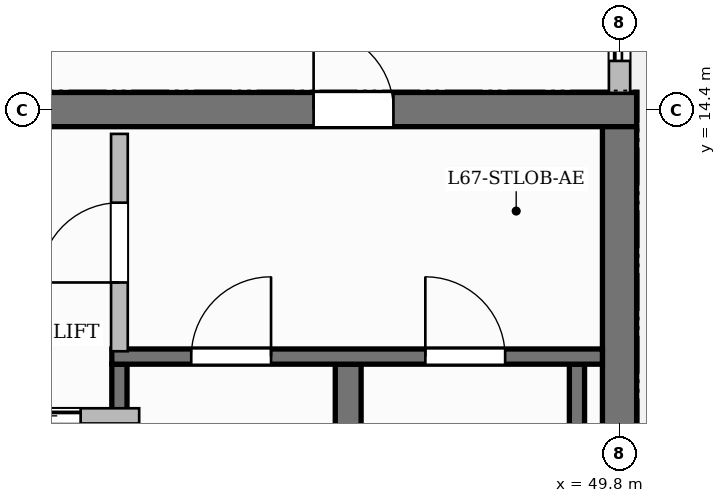
"""IFC4 building model, lengths in metres.
Left out: names, types, materials, properties, quantities, classifications, styles, units other than length and angle.
Written with IfcOpenShell. Run it as: python <this file> out.ifc"""

import sys

from ifc_helpers import new_model, si_unit, direction, frame, frame_2d, origin, place, context, subcontext, project, spatial, rectangle, extrude, source, transform, mapped, element, fill, save


model = new_model("IFC4")
c1 = context("Model", 3, precision=1e-05, world=origin(), true_north=direction((0.0, 1.0)))
c2 = subcontext(c1, "Body", "Model", "MODEL_VIEW")
j1 = project(units=[si_unit("LENGTHUNIT", "METRE"), si_unit("PLANEANGLEUNIT", "RADIAN")], contexts=[c1])
p1 = place(None, origin())
s1 = spatial("IfcSite", under=j1, at=p1, CompositionType="ELEMENT")
p2 = place(p1, origin())
s2 = spatial("IfcBuilding", under=s1, at=p2, CompositionType="ELEMENT")
p3 = place(p2, frame((0.0, 0.0, 267.35)))
s3 = spatial("IfcBuildingStorey", under=s2, at=p3, CompositionType="ELEMENT", Elevation=267.35)
p4 = place(p3, frame((34.575, 14.4, 0.0), z_axis=(0.0, 0.0, 1.0), x_axis=(1.0, 0.0, 0.0)))
e1 = element("IfcWall", 1, at=p4, inside=s3, PredefinedType="SHEAR", context=c2, shape_type="SweptSolid", body=[
    extrude(rectangle(XDim=15.45, YDim=0.45, at=frame_2d((7.725, 0.0))), origin(), (0.0, 0.0, 1.0), 3.85),
])
p5 = place(p4, frame((5.355, 0.0, 0.0)))
e2 = element("IfcOpeningElement", 2, at=p5, cuts=e1, PredefinedType="OPENING", context=c2, shape_type="SweptSolid", body=[
    extrude(rectangle(XDim=1.5, YDim=2.2, at=frame_2d((0.75, 1.1))), frame((0.0, 0.235, 0.0), z_axis=(0.0, -1.0, 0.0), x_axis=(1.0, 0.0, 0.0)), (0.0, 0.0, 1.0), 0.47),
])
p6 = place(p4, frame((1.57, 0.0, 0.0)))
e3 = element("IfcOpeningElement", 3, at=p6, cuts=e1, PredefinedType="OPENING", context=c2, shape_type="SweptSolid", body=[
    extrude(rectangle(XDim=1.05, YDim=2.15, at=frame_2d((0.525, 1.075))), frame((0.0, 0.235, 0.0), z_axis=(0.0, -1.0, 0.0), x_axis=(1.0, 0.0, 0.0)), (0.0, 0.0, 1.0), 0.47),
])
p7 = place(p4, frame((11.2, 0.0, 0.0)))
e4 = element("IfcOpeningElement", 4, at=p7, cuts=e1, PredefinedType="OPENING", context=c2, shape_type="SweptSolid", body=[
    extrude(rectangle(XDim=1.05, YDim=2.15, at=frame_2d((0.525, 1.075))), frame((0.0, 0.235, 0.0), z_axis=(0.0, -1.0, 0.0), x_axis=(1.0, 0.0, 0.0)), (0.0, 0.0, 1.0), 0.47),
])
p8 = place(p3, frame((49.8, 3.825, 0.0), z_axis=(0.0, 0.0, 1.0), x_axis=(0.0, 1.0, 0.0)))
e5 = element("IfcWall", 5, at=p8, inside=s3, PredefinedType="SHEAR", context=c2, shape_type="SweptSolid", body=[
    extrude(rectangle(XDim=10.35, YDim=0.45, at=frame_2d((5.175, 0.0))), origin(), (0.0, 0.0, 1.0), 3.85),
])
p9 = place(p3, frame((43.22, 4.1, 0.0), z_axis=(0.0, 0.0, 1.0), x_axis=(0.0, 1.0, 0.0)))
e6 = element("IfcWall", 6, at=p9, inside=s3, PredefinedType="SHEAR", context=c2, shape_type="SweptSolid", body=[
    extrude(rectangle(XDim=6.95, YDim=0.2, at=frame_2d((3.475, 0.0))), origin(), (0.0, 0.0, 1.0), 3.85),
])
p10 = place(p3, frame((46.23, 4.1, 0.0), z_axis=(0.0, 0.0, 1.0), x_axis=(0.0, 1.0, 0.0)))
e7 = element("IfcWall", 7, at=p10, inside=s3, PredefinedType="SHEAR", context=c2, shape_type="SweptSolid", body=[
    extrude(rectangle(XDim=6.95, YDim=0.34, at=frame_2d((3.475, 0.0))), origin(), (0.0, 0.0, 1.0), 3.85),
])
p11 = place(p3, frame((49.24, 4.1, 0.0), z_axis=(0.0, 0.0, 1.0), x_axis=(0.0, 1.0, 0.0)))
e8 = element("IfcWall", 8, at=p11, inside=s3, PredefinedType="SHEAR", context=c2, shape_type="SweptSolid", body=[
    extrude(rectangle(XDim=6.95, YDim=0.2, at=frame_2d((3.475, 0.0))), origin(), (0.0, 0.0, 1.0), 3.85),
])
p12 = place(p3, frame((43.12, 11.15, 0.0), z_axis=(0.0, 0.0, 1.0), x_axis=(1.0, 0.0, 0.0)))
e9 = element("IfcWall", 9, at=p12, inside=s3, PredefinedType="SHEAR", context=c2, shape_type="SweptSolid", body=[
    extrude(rectangle(XDim=6.455, YDim=0.2, at=frame_2d((3.228, 0.0))), origin(), (0.0, 0.0, 1.0), 3.85),
])
p13 = place(p12, frame((1.045, 0.0, 0.0)))
e10 = element("IfcOpeningElement", 10, at=p13, cuts=e9, PredefinedType="OPENING", context=c2, shape_type="SweptSolid", body=[
    extrude(rectangle(XDim=1.05, YDim=2.2, at=frame_2d((0.525, 1.1))), frame((0.0, 0.11, 0.0), z_axis=(0.0, -1.0, 0.0), x_axis=(1.0, 0.0, 0.0)), (0.0, 0.0, 1.0), 0.22),
])
p14 = place(p12, frame((4.125, 0.0, 0.0)))
e11 = element("IfcOpeningElement", 11, at=p14, cuts=e9, PredefinedType="OPENING", context=c2, shape_type="SweptSolid", body=[
    extrude(rectangle(XDim=1.05, YDim=2.2, at=frame_2d((0.525, 1.1))), frame((0.0, 0.11, 0.0), z_axis=(0.0, -1.0, 0.0), x_axis=(1.0, 0.0, 0.0)), (0.0, 0.0, 1.0), 0.22),
])
p15 = place(p3, frame((43.22, 11.22, 0.0), z_axis=(0.0, 0.0, 1.0), x_axis=(0.0, 1.0, 0.0)))
e12 = element("IfcWall", 12, at=p15, inside=s3, PredefinedType="PARTITIONING", context=c2, shape_type="SweptSolid", body=[
    extrude(rectangle(XDim=2.86, YDim=0.22, at=frame_2d((1.43, 0.0))), origin(), (0.0, 0.0, 1.0), 3.6),
])
p16 = place(p15, frame((0.905, 0.0, 0.0)))
e13 = element("IfcOpeningElement", 13, at=p16, cuts=e12, PredefinedType="OPENING", context=c2, shape_type="SweptSolid", body=[
    extrude(rectangle(XDim=1.05, YDim=2.15, at=frame_2d((0.525, 1.075))), frame((0.0, 0.12, 0.0), z_axis=(0.0, -1.0, 0.0), x_axis=(1.0, 0.0, 0.0)), (0.0, 0.0, 1.0), 0.24),
])
p17 = place(p3, frame((40.84, 10.37, 0.0), z_axis=(0.0, 0.0, 1.0), x_axis=(1.0, 0.0, 0.0)))
e14 = element("IfcWall", 14, at=p17, inside=s3, PredefinedType="PARTITIONING", context=c2, shape_type="SweptSolid", body=[
    extrude(rectangle(XDim=2.64, YDim=0.2, at=frame_2d((1.32, 0.0))), origin(), (0.0, 0.0, 1.0), 3.6),
])
p18 = place(p17, frame((0.77, 0.0, 0.0)))
e15 = element("IfcOpeningElement", 15, at=p18, cuts=e14, PredefinedType="OPENING", context=c2, shape_type="SweptSolid", body=[
    extrude(rectangle(XDim=1.1, YDim=2.2, at=frame_2d((0.55, 1.1))), frame((0.0, 0.11, 0.0), z_axis=(0.0, -1.0, 0.0), x_axis=(1.0, 0.0, 0.0)), (0.0, 0.0, 1.0), 0.22),
])
p19 = place(p3, frame((49.8, 14.62, 0.0), z_axis=(0.0, 0.0, 1.0), x_axis=(0.0, 1.0, 0.0)))
e16 = element("IfcWall", 16, at=p19, inside=s3, PredefinedType="SOLIDWALL", context=c2, shape_type="SweptSolid", body=[
    extrude(rectangle(XDim=6.93, YDim=0.28, at=frame_2d((3.465, 0.0))), origin(), (0.0, 0.0, 1.0), 3.185),
])
p20 = place(p19, frame((0.42, 0.0, 0.0)))
e17 = element("IfcOpeningElement", 17, at=p20, cuts=e16, PredefinedType="OPENING", context=c2, shape_type="SweptSolid", body=[
    extrude(rectangle(XDim=1.2, YDim=2.2, at=frame_2d((0.6, 1.1))), frame((0.0, 0.15, 0.0), z_axis=(0.0, -1.0, 0.0), x_axis=(1.0, 0.0, 0.0)), (0.0, 0.0, 1.0), 0.3),
])
p21 = place(p19, frame((3.659, 0.0, 0.8)))
e18 = element("IfcOpeningElement", 18, at=p21, cuts=e16, PredefinedType="OPENING", context=c2, shape_type="SweptSolid", body=[
    extrude(rectangle(XDim=1.8, YDim=1.85, at=frame_2d((0.9, 0.925))), frame((0.0, 0.15, 0.0), z_axis=(0.0, -1.0, 0.0), x_axis=(1.0, 0.0, 0.0)), (0.0, 0.0, 1.0), 0.3),
])
m1 = source(origin(), c2, "Body", "SweptSolid", [
    extrude(rectangle(XDim=1.05, YDim=2.2, at=frame_2d((0.525, 1.1))), frame((0.0, 0.025, 0.0), z_axis=(0.0, -1.0, 0.0), x_axis=(1.0, 0.0, 0.0)), (0.0, 0.0, 1.0), 0.05),
])
p22 = place(p13, origin())
e19 = element("IfcDoor", 19, at=p22, inside=s3, OperationType="SINGLE_SWING_RIGHT", PredefinedType="DOOR", context=c2, shape_type="MappedRepresentation", body=[
    mapped(m1, transform((0.0, 0.0, 0.0), scale=1.0)),
])
fill(e10, e19)
p23 = place(p14, origin())
e20 = element("IfcDoor", 20, at=p23, inside=s3, OperationType="SINGLE_SWING_LEFT", PredefinedType="DOOR", context=c2, shape_type="MappedRepresentation", body=[
    mapped(m1, transform((0.0, 0.0, 0.0), scale=1.0)),
])
fill(e11, e20)
m2 = source(origin(), c2, "Body", "SweptSolid", [
    extrude(rectangle(XDim=1.05, YDim=2.15, at=frame_2d((0.525, 1.075))), frame((0.0, 0.025, 0.0), z_axis=(0.0, -1.0, 0.0), x_axis=(1.0, 0.0, 0.0)), (0.0, 0.0, 1.0), 0.05),
])
p24 = place(p16, origin())
e21 = element("IfcDoor", 21, at=p24, inside=s3, OperationType="SINGLE_SWING_LEFT", PredefinedType="DOOR", context=c2, shape_type="MappedRepresentation", body=[
    mapped(m2, transform((0.0, 0.0, 0.0), scale=1.0)),
])
fill(e13, e21)
p25 = place(p7, origin())
e22 = element("IfcDoor", 22, at=p25, inside=s3, OperationType="SINGLE_SWING_LEFT", PredefinedType="DOOR", context=c2, shape_type="MappedRepresentation", body=[
    mapped(m2, transform((0.0, 0.0, 0.0), scale=1.0)),
])
fill(e4, e22)
m3 = source(origin(), c2, "Body", "SweptSolid", [
    extrude(rectangle(XDim=1.1, YDim=2.2, at=frame_2d((0.55, 1.1))), frame((0.0, 0.025, 0.0), z_axis=(0.0, -1.0, 0.0), x_axis=(1.0, 0.0, 0.0)), (0.0, 0.0, 1.0), 0.05),
])
p26 = place(p18, origin())
e23 = element("IfcDoor", 23, at=p26, inside=s3, OperationType="SLIDING_TO_LEFT", PredefinedType="DOOR", context=c2, shape_type="MappedRepresentation", body=[
    mapped(m3, transform((0.0, 0.0, 0.0), scale=1.0)),
])
fill(e15, e23)
m4 = source(origin(), c2, "Body", "SweptSolid", [
    extrude(rectangle(XDim=1.2, YDim=2.2, at=frame_2d((0.6, 1.1))), frame((0.0, 0.025, 0.0), z_axis=(0.0, -1.0, 0.0), x_axis=(1.0, 0.0, 0.0)), (0.0, 0.0, 1.0), 0.05),
])
p27 = place(p20, origin())
e24 = element("IfcDoor", 24, at=p27, inside=s3, OperationType="SLIDING_TO_LEFT", PredefinedType="DOOR", context=c2, shape_type="MappedRepresentation", body=[
    mapped(m4, transform((0.0, 0.0, 0.0), scale=1.0)),
])
fill(e17, e24)
save(model, sys.argv[1])
